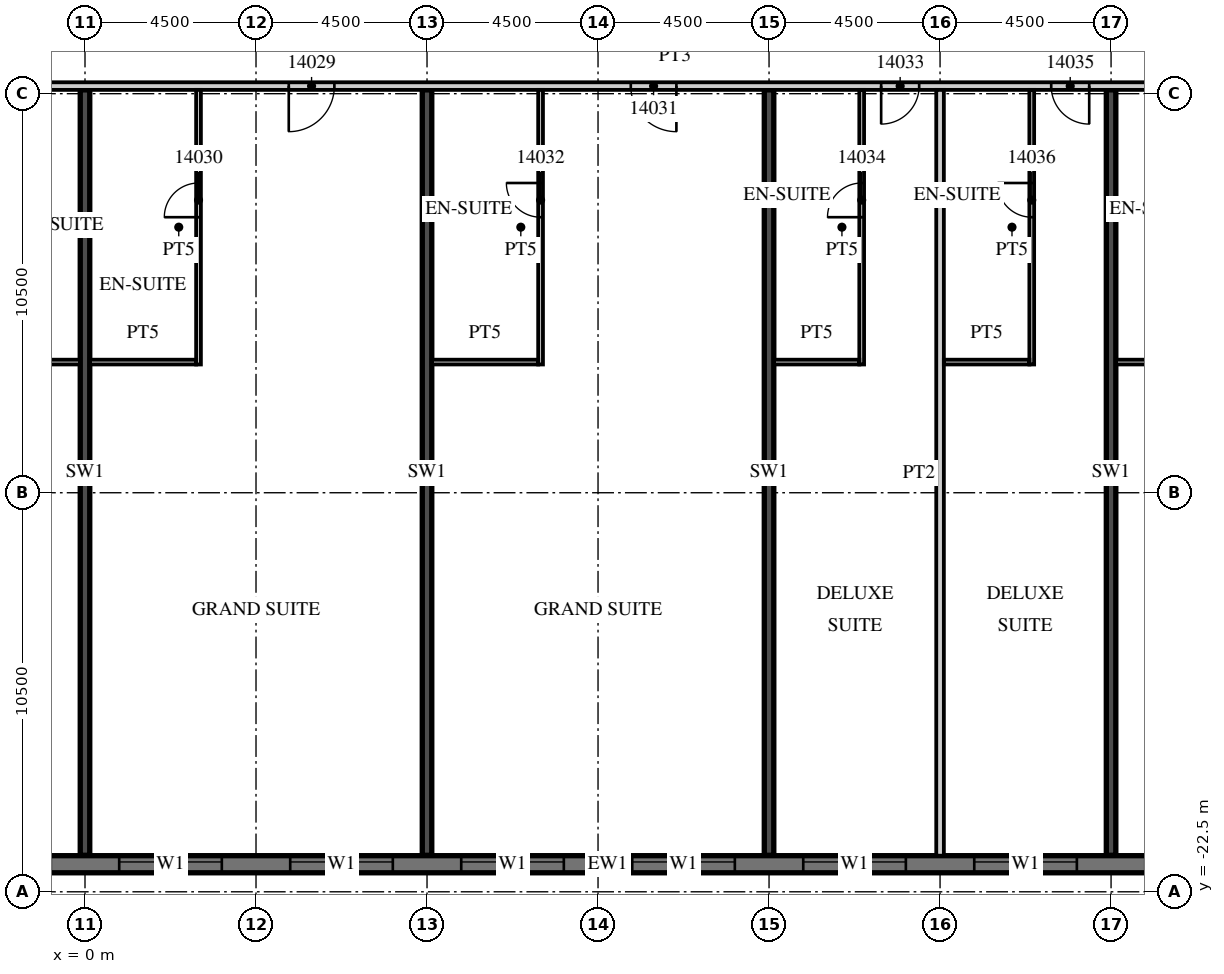
"""IFC4 building model, lengths in metres.
Left out: names, types, materials, properties, quantities, classifications, styles, units other than length and angle.
Written with IfcOpenShell. Run it as: python <this file> out.ifc"""

import sys

from ifc_helpers import new_model, si_unit, direction, frame, frame_2d, origin, place, context, subcontext, project, spatial, rectangle, extrude, element, fill, save


model = new_model("IFC4")
c1 = context("Model", 3, precision=1e-05, world=origin(), true_north=direction((0.0, 1.0)))
c2 = subcontext(c1, "Body", "Model", "MODEL_VIEW")
j1 = project(units=[si_unit("LENGTHUNIT", "METRE"), si_unit("PLANEANGLEUNIT", "RADIAN")], contexts=[c1])
p1 = place(None, origin())
s1 = spatial("IfcSite", under=j1, at=p1, CompositionType="ELEMENT")
p2 = place(p1, origin())
s2 = spatial("IfcBuilding", under=s1, at=p2, CompositionType="ELEMENT")
p3 = place(p2, frame((0.0, 0.0, 76.5)))
s3 = spatial("IfcBuildingStorey", under=s2, at=p3, CompositionType="ELEMENT", Elevation=76.5)
for number, where, z_axis, x_axis in (
    (1, (0.0, -21.54, 0.0), (0.0, 0.0, 1.0), (0.0, 1.0, 0.0)),
    (2, (9.0, -21.54, 0.0), (0.0, 0.0, 1.0), (0.0, 1.0, 0.0)),
    (3, (18.0, -21.54, 0.0), (0.0, 0.0, 1.0), (0.0, 1.0, 0.0)),
    (4, (27.0, -21.54, 0.0), (0.0, 0.0, 1.0), (0.0, 1.0, 0.0)),
):
    element("IfcWall", number, at=place(p3, frame(where, z_axis=z_axis, x_axis=x_axis)), inside=s3, PredefinedType="SHEAR", context=c2, shape_type="SweptSolid", body=[
        extrude(rectangle(XDim=20.14, YDim=0.25, at=frame_2d((10.07, 0.0))), origin(), (0.0, 0.0, 1.0), 3.3),
    ])
p4 = place(p3, frame((-13.5, -21.775, 0.0), z_axis=(0.0, 0.0, 1.0), x_axis=(1.0, 0.0, 0.0)))
e5 = element("IfcWall", 5, at=p4, inside=s3, PredefinedType="SOLIDWALL", context=c2, shape_type="SweptSolid", body=[
    extrude(rectangle(XDim=54.5, YDim=0.45, at=frame_2d((27.25, 0.0))), origin(), (0.0, 0.0, 1.0), 3.02),
])
p5 = place(p4, frame((0.9, 0.0, 0.45)))
e6 = element("IfcOpeningElement", 6, at=p5, cuts=e5, PredefinedType="OPENING", context=c2, shape_type="SweptSolid", body=[
    extrude(rectangle(XDim=2.7, YDim=2.25, at=frame_2d((1.35, 1.125))), frame((0.0, 0.235, 0.0), z_axis=(0.0, -1.0, 0.0), x_axis=(1.0, 0.0, 0.0)), (0.0, 0.0, 1.0), 0.47),
])
p6 = place(p4, frame((5.4, 0.0, 0.45)))
e7 = element("IfcOpeningElement", 7, at=p6, cuts=e5, PredefinedType="OPENING", context=c2, shape_type="SweptSolid", body=[
    extrude(rectangle(XDim=2.7, YDim=2.25, at=frame_2d((1.35, 1.125))), frame((0.0, 0.235, 0.0), z_axis=(0.0, -1.0, 0.0), x_axis=(1.0, 0.0, 0.0)), (0.0, 0.0, 1.0), 0.47),
])
p7 = place(p4, frame((9.9, 0.0, 0.45)))
e8 = element("IfcOpeningElement", 8, at=p7, cuts=e5, PredefinedType="OPENING", context=c2, shape_type="SweptSolid", body=[
    extrude(rectangle(XDim=2.7, YDim=2.25, at=frame_2d((1.35, 1.125))), frame((0.0, 0.235, 0.0), z_axis=(0.0, -1.0, 0.0), x_axis=(1.0, 0.0, 0.0)), (0.0, 0.0, 1.0), 0.47),
])
p8 = place(p4, frame((14.4, 0.0, 0.45)))
e9 = element("IfcOpeningElement", 9, at=p8, cuts=e5, PredefinedType="OPENING", context=c2, shape_type="SweptSolid", body=[
    extrude(rectangle(XDim=2.7, YDim=2.25, at=frame_2d((1.35, 1.125))), frame((0.0, 0.235, 0.0), z_axis=(0.0, -1.0, 0.0), x_axis=(1.0, 0.0, 0.0)), (0.0, 0.0, 1.0), 0.47),
])
p9 = place(p4, frame((18.9, 0.0, 0.45)))
e10 = element("IfcOpeningElement", 10, at=p9, cuts=e5, PredefinedType="OPENING", context=c2, shape_type="SweptSolid", body=[
    extrude(rectangle(XDim=2.7, YDim=2.25, at=frame_2d((1.35, 1.125))), frame((0.0, 0.235, 0.0), z_axis=(0.0, -1.0, 0.0), x_axis=(1.0, 0.0, 0.0)), (0.0, 0.0, 1.0), 0.47),
])
p10 = place(p4, frame((23.4, 0.0, 0.45)))
e11 = element("IfcOpeningElement", 11, at=p10, cuts=e5, PredefinedType="OPENING", context=c2, shape_type="SweptSolid", body=[
    extrude(rectangle(XDim=2.7, YDim=2.25, at=frame_2d((1.35, 1.125))), frame((0.0, 0.235, 0.0), z_axis=(0.0, -1.0, 0.0), x_axis=(1.0, 0.0, 0.0)), (0.0, 0.0, 1.0), 0.47),
])
p11 = place(p4, frame((27.9, 0.0, 0.45)))
e12 = element("IfcOpeningElement", 12, at=p11, cuts=e5, PredefinedType="OPENING", context=c2, shape_type="SweptSolid", body=[
    extrude(rectangle(XDim=2.7, YDim=2.25, at=frame_2d((1.35, 1.125))), frame((0.0, 0.235, 0.0), z_axis=(0.0, -1.0, 0.0), x_axis=(1.0, 0.0, 0.0)), (0.0, 0.0, 1.0), 0.47),
])
p12 = place(p4, frame((32.4, 0.0, 0.45)))
e13 = element("IfcOpeningElement", 13, at=p12, cuts=e5, PredefinedType="OPENING", context=c2, shape_type="SweptSolid", body=[
    extrude(rectangle(XDim=2.7, YDim=2.25, at=frame_2d((1.35, 1.125))), frame((0.0, 0.235, 0.0), z_axis=(0.0, -1.0, 0.0), x_axis=(1.0, 0.0, 0.0)), (0.0, 0.0, 1.0), 0.47),
])
p13 = place(p4, frame((36.9, 0.0, 0.45)))
e14 = element("IfcOpeningElement", 14, at=p13, cuts=e5, PredefinedType="OPENING", context=c2, shape_type="SweptSolid", body=[
    extrude(rectangle(XDim=2.7, YDim=2.25, at=frame_2d((1.35, 1.125))), frame((0.0, 0.235, 0.0), z_axis=(0.0, -1.0, 0.0), x_axis=(1.0, 0.0, 0.0)), (0.0, 0.0, 1.0), 0.47),
])
p14 = place(p4, frame((41.4, 0.0, 0.45)))
e15 = element("IfcOpeningElement", 15, at=p14, cuts=e5, PredefinedType="OPENING", context=c2, shape_type="SweptSolid", body=[
    extrude(rectangle(XDim=2.7, YDim=2.25, at=frame_2d((1.35, 1.125))), frame((0.0, 0.235, 0.0), z_axis=(0.0, -1.0, 0.0), x_axis=(1.0, 0.0, 0.0)), (0.0, 0.0, 1.0), 0.47),
])
p15 = place(p4, frame((45.9, 0.0, 0.45)))
e16 = element("IfcOpeningElement", 16, at=p15, cuts=e5, PredefinedType="OPENING", context=c2, shape_type="SweptSolid", body=[
    extrude(rectangle(XDim=2.7, YDim=2.25, at=frame_2d((1.35, 1.125))), frame((0.0, 0.235, 0.0), z_axis=(0.0, -1.0, 0.0), x_axis=(1.0, 0.0, 0.0)), (0.0, 0.0, 1.0), 0.47),
])
p16 = place(p4, frame((50.4, 0.0, 0.45)))
e17 = element("IfcOpeningElement", 17, at=p16, cuts=e5, PredefinedType="OPENING", context=c2, shape_type="SweptSolid", body=[
    extrude(rectangle(XDim=2.7, YDim=2.25, at=frame_2d((1.35, 1.125))), frame((0.0, 0.235, 0.0), z_axis=(0.0, -1.0, 0.0), x_axis=(1.0, 0.0, 0.0)), (0.0, 0.0, 1.0), 0.47),
])
p17 = place(p3, frame((-13.5, -1.3, 0.0), z_axis=(0.0, 0.0, 1.0), x_axis=(1.0, 0.0, 0.0)))
e18 = element("IfcWall", 18, at=p17, inside=s3, PredefinedType="PARTITIONING", context=c2, shape_type="SweptSolid", body=[
    extrude(rectangle(XDim=58.05, YDim=0.2, at=frame_2d((29.025, 0.0))), origin(), (0.0, 0.0, 1.0), 3.02),
])
p18 = place(p17, frame((2.925, 0.0, 0.0)))
e19 = element("IfcOpeningElement", 19, at=p18, cuts=e18, PredefinedType="OPENING", context=c2, shape_type="SweptSolid", body=[
    extrude(rectangle(XDim=1.0, YDim=2.1, at=frame_2d((0.5, 1.05))), frame((0.0, 0.11, 0.0), z_axis=(0.0, -1.0, 0.0), x_axis=(1.0, 0.0, 0.0)), (0.0, 0.0, 1.0), 0.22),
])
p19 = place(p17, frame((5.075, 0.0, 0.0)))
e20 = element("IfcOpeningElement", 20, at=p19, cuts=e18, PredefinedType="OPENING", context=c2, shape_type="SweptSolid", body=[
    extrude(rectangle(XDim=1.0, YDim=2.1, at=frame_2d((0.5, 1.05))), frame((0.0, 0.11, 0.0), z_axis=(0.0, -1.0, 0.0), x_axis=(1.0, 0.0, 0.0)), (0.0, 0.0, 1.0), 0.22),
])
p20 = place(p17, frame((9.55, 0.0, 0.0)))
e21 = element("IfcOpeningElement", 21, at=p20, cuts=e18, PredefinedType="OPENING", context=c2, shape_type="SweptSolid", body=[
    extrude(rectangle(XDim=1.0, YDim=2.1, at=frame_2d((0.5, 1.05))), frame((0.0, 0.11, 0.0), z_axis=(0.0, -1.0, 0.0), x_axis=(1.0, 0.0, 0.0)), (0.0, 0.0, 1.0), 0.22),
])
p21 = place(p17, frame((18.862, 0.0, 0.0)))
e22 = element("IfcOpeningElement", 22, at=p21, cuts=e18, PredefinedType="OPENING", context=c2, shape_type="SweptSolid", body=[
    extrude(rectangle(XDim=1.2, YDim=2.1, at=frame_2d((0.6, 1.05))), frame((0.0, 0.11, 0.0), z_axis=(0.0, -1.0, 0.0), x_axis=(1.0, 0.0, 0.0)), (0.0, 0.0, 1.0), 0.22),
])
p22 = place(p17, frame((27.862, 0.0, 0.0)))
e23 = element("IfcOpeningElement", 23, at=p22, cuts=e18, PredefinedType="OPENING", context=c2, shape_type="SweptSolid", body=[
    extrude(rectangle(XDim=1.2, YDim=2.1, at=frame_2d((0.6, 1.05))), frame((0.0, 0.11, 0.0), z_axis=(0.0, -1.0, 0.0), x_axis=(1.0, 0.0, 0.0)), (0.0, 0.0, 1.0), 0.22),
])
p23 = place(p17, frame((34.45, 0.0, 0.0)))
e24 = element("IfcOpeningElement", 24, at=p23, cuts=e18, PredefinedType="OPENING", context=c2, shape_type="SweptSolid", body=[
    extrude(rectangle(XDim=1.0, YDim=2.1, at=frame_2d((0.5, 1.05))), frame((0.0, 0.11, 0.0), z_axis=(0.0, -1.0, 0.0), x_axis=(1.0, 0.0, 0.0)), (0.0, 0.0, 1.0), 0.22),
])
p24 = place(p17, frame((38.925, 0.0, 0.0)))
e25 = element("IfcOpeningElement", 25, at=p24, cuts=e18, PredefinedType="OPENING", context=c2, shape_type="SweptSolid", body=[
    extrude(rectangle(XDim=1.0, YDim=2.1, at=frame_2d((0.5, 1.05))), frame((0.0, 0.11, 0.0), z_axis=(0.0, -1.0, 0.0), x_axis=(1.0, 0.0, 0.0)), (0.0, 0.0, 1.0), 0.22),
])
p25 = place(p17, frame((45.862, 0.0, 0.0)))
e26 = element("IfcOpeningElement", 26, at=p25, cuts=e18, PredefinedType="OPENING", context=c2, shape_type="SweptSolid", body=[
    extrude(rectangle(XDim=1.2, YDim=2.1, at=frame_2d((0.6, 1.05))), frame((0.0, 0.11, 0.0), z_axis=(0.0, -1.0, 0.0), x_axis=(1.0, 0.0, 0.0)), (0.0, 0.0, 1.0), 0.22),
])
p26 = place(p17, frame((50.075, 0.0, 0.0)))
e27 = element("IfcOpeningElement", 27, at=p26, cuts=e18, PredefinedType="OPENING", context=c2, shape_type="SweptSolid", body=[
    extrude(rectangle(XDim=1.0, YDim=2.1, at=frame_2d((0.5, 1.05))), frame((0.0, 0.11, 0.0), z_axis=(0.0, -1.0, 0.0), x_axis=(1.0, 0.0, 0.0)), (0.0, 0.0, 1.0), 0.22),
])
p27 = place(p17, frame((56.525, 0.0, 0.0)))
e28 = element("IfcOpeningElement", 28, at=p27, cuts=e18, PredefinedType="OPENING", context=c2, shape_type="SweptSolid", body=[
    extrude(rectangle(XDim=1.0, YDim=2.1, at=frame_2d((0.5, 1.05))), frame((0.0, 0.11, 0.0), z_axis=(0.0, -1.0, 0.0), x_axis=(1.0, 0.0, 0.0)), (0.0, 0.0, 1.0), 0.22),
])
p28 = place(p3, frame((-2.375, -8.562, 0.0), z_axis=(0.0, 0.0, 1.0), x_axis=(1.0, 0.0, 0.0)))
e29 = element("IfcWall", 29, at=p28, inside=s3, PredefinedType="PARTITIONING", context=c2, shape_type="SweptSolid", body=[
    extrude(rectangle(XDim=2.25, YDim=0.125, at=frame_2d((1.125, 0.0))), origin(), (0.0, 0.0, 1.0), 3.02),
])
p29 = place(p3, frame((2.987, -8.625, 0.0), z_axis=(0.0, 0.0, 1.0), x_axis=(0.0, 1.0, 0.0)))
e30 = element("IfcWall", 30, at=p29, inside=s3, PredefinedType="PARTITIONING", context=c2, shape_type="SweptSolid", body=[
    extrude(rectangle(XDim=7.225, YDim=0.125, at=frame_2d((3.613, 0.0))), origin(), (0.0, 0.0, 1.0), 3.02),
])
p30 = place(p29, frame((3.875, 0.0, 0.0)))
e31 = element("IfcOpeningElement", 31, at=p30, cuts=e30, PredefinedType="OPENING", context=c2, shape_type="SweptSolid", body=[
    extrude(rectangle(XDim=0.9, YDim=2.1, at=frame_2d((0.45, 1.05))), frame((0.0, 0.073, 0.0), z_axis=(0.0, -1.0, 0.0), x_axis=(1.0, 0.0, 0.0)), (0.0, 0.0, 1.0), 0.145),
])
p31 = place(p3, frame((0.125, -8.562, 0.0), z_axis=(0.0, 0.0, 1.0), x_axis=(1.0, 0.0, 0.0)))
e32 = element("IfcWall", 32, at=p31, inside=s3, PredefinedType="PARTITIONING", context=c2, shape_type="SweptSolid", body=[
    extrude(rectangle(XDim=2.8, YDim=0.125, at=frame_2d((1.4, 0.0))), origin(), (0.0, 0.0, 1.0), 3.02),
])
p32 = place(p3, frame((11.988, -8.625, 0.0), z_axis=(0.0, 0.0, 1.0), x_axis=(0.0, 1.0, 0.0)))
e33 = element("IfcWall", 33, at=p32, inside=s3, PredefinedType="PARTITIONING", context=c2, shape_type="SweptSolid", body=[
    extrude(rectangle(XDim=7.225, YDim=0.125, at=frame_2d((3.613, 0.0))), origin(), (0.0, 0.0, 1.0), 3.02),
])
p33 = place(p32, frame((3.875, 0.0, 0.0)))
e34 = element("IfcOpeningElement", 34, at=p33, cuts=e33, PredefinedType="OPENING", context=c2, shape_type="SweptSolid", body=[
    extrude(rectangle(XDim=0.9, YDim=2.1, at=frame_2d((0.45, 1.05))), frame((0.0, 0.073, 0.0), z_axis=(0.0, -1.0, 0.0), x_axis=(1.0, 0.0, 0.0)), (0.0, 0.0, 1.0), 0.145),
])
p34 = place(p3, frame((9.125, -8.562, 0.0), z_axis=(0.0, 0.0, 1.0), x_axis=(1.0, 0.0, 0.0)))
e35 = element("IfcWall", 35, at=p34, inside=s3, PredefinedType="PARTITIONING", context=c2, shape_type="SweptSolid", body=[
    extrude(rectangle(XDim=2.8, YDim=0.125, at=frame_2d((1.4, 0.0))), origin(), (0.0, 0.0, 1.0), 3.02),
])
p35 = place(p3, frame((22.5, -21.55, 0.0), z_axis=(0.0, 0.0, 1.0), x_axis=(0.0, 1.0, 0.0)))
e36 = element("IfcWall", 36, at=p35, inside=s3, PredefinedType="PARTITIONING", context=c2, shape_type="SweptSolid", body=[
    extrude(rectangle(XDim=20.15, YDim=0.2, at=frame_2d((10.075, 0.0))), origin(), (0.0, 0.0, 1.0), 3.02),
])
p36 = place(p3, frame((20.438, -8.625, 0.0), z_axis=(0.0, 0.0, 1.0), x_axis=(0.0, 1.0, 0.0)))
e37 = element("IfcWall", 37, at=p36, inside=s3, PredefinedType="PARTITIONING", context=c2, shape_type="SweptSolid", body=[
    extrude(rectangle(XDim=7.225, YDim=0.125, at=frame_2d((3.613, 0.0))), origin(), (0.0, 0.0, 1.0), 3.02),
])
p37 = place(p36, frame((3.875, 0.0, 0.0)))
e38 = element("IfcOpeningElement", 38, at=p37, cuts=e37, PredefinedType="OPENING", context=c2, shape_type="SweptSolid", body=[
    extrude(rectangle(XDim=0.9, YDim=2.1, at=frame_2d((0.45, 1.05))), frame((0.0, 0.073, 0.0), z_axis=(0.0, -1.0, 0.0), x_axis=(1.0, 0.0, 0.0)), (0.0, 0.0, 1.0), 0.145),
])
p38 = place(p3, frame((18.125, -8.562, 0.0), z_axis=(0.0, 0.0, 1.0), x_axis=(1.0, 0.0, 0.0)))
e39 = element("IfcWall", 39, at=p38, inside=s3, PredefinedType="PARTITIONING", context=c2, shape_type="SweptSolid", body=[
    extrude(rectangle(XDim=2.25, YDim=0.125, at=frame_2d((1.125, 0.0))), origin(), (0.0, 0.0, 1.0), 3.02),
])
p39 = place(p3, frame((24.913, -8.625, 0.0), z_axis=(0.0, 0.0, 1.0), x_axis=(0.0, 1.0, 0.0)))
e40 = element("IfcWall", 40, at=p39, inside=s3, PredefinedType="PARTITIONING", context=c2, shape_type="SweptSolid", body=[
    extrude(rectangle(XDim=7.225, YDim=0.125, at=frame_2d((3.613, 0.0))), origin(), (0.0, 0.0, 1.0), 3.02),
])
p40 = place(p39, frame((3.875, 0.0, 0.0)))
e41 = element("IfcOpeningElement", 41, at=p40, cuts=e40, PredefinedType="OPENING", context=c2, shape_type="SweptSolid", body=[
    extrude(rectangle(XDim=0.9, YDim=2.1, at=frame_2d((0.45, 1.05))), frame((0.0, 0.073, 0.0), z_axis=(0.0, -1.0, 0.0), x_axis=(1.0, 0.0, 0.0)), (0.0, 0.0, 1.0), 0.145),
])
p41 = place(p3, frame((22.6, -8.562, 0.0), z_axis=(0.0, 0.0, 1.0), x_axis=(1.0, 0.0, 0.0)))
e42 = element("IfcWall", 42, at=p41, inside=s3, PredefinedType="PARTITIONING", context=c2, shape_type="SweptSolid", body=[
    extrude(rectangle(XDim=2.25, YDim=0.125, at=frame_2d((1.125, 0.0))), origin(), (0.0, 0.0, 1.0), 3.02),
])
p42 = place(p3, frame((27.125, -8.562, 0.0), z_axis=(0.0, 0.0, 1.0), x_axis=(1.0, 0.0, 0.0)))
e43 = element("IfcWall", 43, at=p42, inside=s3, PredefinedType="PARTITIONING", context=c2, shape_type="SweptSolid", body=[
    extrude(rectangle(XDim=2.8, YDim=0.125, at=frame_2d((1.4, 0.0))), origin(), (0.0, 0.0, 1.0), 3.02),
])
p43 = place(p8, origin())
e44 = element("IfcWindow", 44, at=p43, inside=s3, PartitioningType="SINGLE_PANEL", PredefinedType="WINDOW", context=c2, shape_type="SweptSolid", body=[
    extrude(rectangle(XDim=2.7, YDim=2.25, at=frame_2d((1.35, 1.125))), frame((0.0, 0.09, 0.0), z_axis=(0.0, -1.0, 0.0), x_axis=(1.0, 0.0, 0.0)), (0.0, 0.0, 1.0), 0.06),
])
fill(e9, e44)
p44 = place(p9, origin())
e45 = element("IfcWindow", 45, at=p44, inside=s3, PartitioningType="SINGLE_PANEL", PredefinedType="WINDOW", context=c2, shape_type="SweptSolid", body=[
    extrude(rectangle(XDim=2.7, YDim=2.25, at=frame_2d((1.35, 1.125))), frame((0.0, 0.09, 0.0), z_axis=(0.0, -1.0, 0.0), x_axis=(1.0, 0.0, 0.0)), (0.0, 0.0, 1.0), 0.06),
])
fill(e10, e45)
p45 = place(p10, origin())
e46 = element("IfcWindow", 46, at=p45, inside=s3, PartitioningType="SINGLE_PANEL", PredefinedType="WINDOW", context=c2, shape_type="SweptSolid", body=[
    extrude(rectangle(XDim=2.7, YDim=2.25, at=frame_2d((1.35, 1.125))), frame((0.0, 0.09, 0.0), z_axis=(0.0, -1.0, 0.0), x_axis=(1.0, 0.0, 0.0)), (0.0, 0.0, 1.0), 0.06),
])
fill(e11, e46)
p46 = place(p11, origin())
e47 = element("IfcWindow", 47, at=p46, inside=s3, PartitioningType="SINGLE_PANEL", PredefinedType="WINDOW", context=c2, shape_type="SweptSolid", body=[
    extrude(rectangle(XDim=2.7, YDim=2.25, at=frame_2d((1.35, 1.125))), frame((0.0, 0.09, 0.0), z_axis=(0.0, -1.0, 0.0), x_axis=(1.0, 0.0, 0.0)), (0.0, 0.0, 1.0), 0.06),
])
fill(e12, e47)
p47 = place(p12, origin())
e48 = element("IfcWindow", 48, at=p47, inside=s3, PartitioningType="SINGLE_PANEL", PredefinedType="WINDOW", context=c2, shape_type="SweptSolid", body=[
    extrude(rectangle(XDim=2.7, YDim=2.25, at=frame_2d((1.35, 1.125))), frame((0.0, 0.09, 0.0), z_axis=(0.0, -1.0, 0.0), x_axis=(1.0, 0.0, 0.0)), (0.0, 0.0, 1.0), 0.06),
])
fill(e13, e48)
p48 = place(p13, origin())
e49 = element("IfcWindow", 49, at=p48, inside=s3, PartitioningType="SINGLE_PANEL", PredefinedType="WINDOW", context=c2, shape_type="SweptSolid", body=[
    extrude(rectangle(XDim=2.7, YDim=2.25, at=frame_2d((1.35, 1.125))), frame((0.0, 0.09, 0.0), z_axis=(0.0, -1.0, 0.0), x_axis=(1.0, 0.0, 0.0)), (0.0, 0.0, 1.0), 0.06),
])
fill(e14, e49)
p49 = place(p21, origin())
e50 = element("IfcDoor", 50, at=p49, inside=s3, OperationType="SINGLE_SWING_LEFT", PredefinedType="DOOR", context=c2, shape_type="SweptSolid", body=[
    extrude(rectangle(XDim=1.2, YDim=2.1, at=frame_2d((0.6, 1.05))), frame((0.0, 0.025, 0.0), z_axis=(0.0, -1.0, 0.0), x_axis=(1.0, 0.0, 0.0)), (0.0, 0.0, 1.0), 0.05),
])
fill(e22, e50)
p50 = place(p30, origin())
e51 = element("IfcDoor", 51, at=p50, inside=s3, OperationType="SINGLE_SWING_LEFT", PredefinedType="DOOR", context=c2, shape_type="SweptSolid", body=[
    extrude(rectangle(XDim=0.9, YDim=2.1, at=frame_2d((0.45, 1.05))), frame((0.0, 0.025, 0.0), z_axis=(0.0, -1.0, 0.0), x_axis=(1.0, 0.0, 0.0)), (0.0, 0.0, 1.0), 0.05),
])
fill(e31, e51)
p51 = place(p22, origin())
e52 = element("IfcDoor", 52, at=p51, inside=s3, OperationType="SINGLE_SWING_RIGHT", PredefinedType="DOOR", context=c2, shape_type="SweptSolid", body=[
    extrude(rectangle(XDim=1.2, YDim=2.1, at=frame_2d((0.6, 1.05))), frame((0.0, 0.025, 0.0), z_axis=(0.0, -1.0, 0.0), x_axis=(1.0, 0.0, 0.0)), (0.0, 0.0, 1.0), 0.05),
])
fill(e23, e52)
p52 = place(p33, origin())
e53 = element("IfcDoor", 53, at=p52, inside=s3, OperationType="SINGLE_SWING_RIGHT", PredefinedType="DOOR", context=c2, shape_type="SweptSolid", body=[
    extrude(rectangle(XDim=0.9, YDim=2.1, at=frame_2d((0.45, 1.05))), frame((0.0, 0.025, 0.0), z_axis=(0.0, -1.0, 0.0), x_axis=(1.0, 0.0, 0.0)), (0.0, 0.0, 1.0), 0.05),
])
fill(e34, e53)
p53 = place(p23, origin())
e54 = element("IfcDoor", 54, at=p53, inside=s3, OperationType="SINGLE_SWING_LEFT", PredefinedType="DOOR", context=c2, shape_type="SweptSolid", body=[
    extrude(rectangle(XDim=1.0, YDim=2.1, at=frame_2d((0.5, 1.05))), frame((0.0, 0.025, 0.0), z_axis=(0.0, -1.0, 0.0), x_axis=(1.0, 0.0, 0.0)), (0.0, 0.0, 1.0), 0.05),
])
fill(e24, e54)
p54 = place(p37, origin())
e55 = element("IfcDoor", 55, at=p54, inside=s3, OperationType="SINGLE_SWING_LEFT", PredefinedType="DOOR", context=c2, shape_type="SweptSolid", body=[
    extrude(rectangle(XDim=0.9, YDim=2.1, at=frame_2d((0.45, 1.05))), frame((0.0, 0.025, 0.0), z_axis=(0.0, -1.0, 0.0), x_axis=(1.0, 0.0, 0.0)), (0.0, 0.0, 1.0), 0.05),
])
fill(e38, e55)
p55 = place(p24, origin())
e56 = element("IfcDoor", 56, at=p55, inside=s3, OperationType="SINGLE_SWING_RIGHT", PredefinedType="DOOR", context=c2, shape_type="SweptSolid", body=[
    extrude(rectangle(XDim=1.0, YDim=2.1, at=frame_2d((0.5, 1.05))), frame((0.0, 0.025, 0.0), z_axis=(0.0, -1.0, 0.0), x_axis=(1.0, 0.0, 0.0)), (0.0, 0.0, 1.0), 0.05),
])
fill(e25, e56)
p56 = place(p40, origin())
e57 = element("IfcDoor", 57, at=p56, inside=s3, OperationType="SINGLE_SWING_RIGHT", PredefinedType="DOOR", context=c2, shape_type="SweptSolid", body=[
    extrude(rectangle(XDim=0.9, YDim=2.1, at=frame_2d((0.45, 1.05))), frame((0.0, 0.025, 0.0), z_axis=(0.0, -1.0, 0.0), x_axis=(1.0, 0.0, 0.0)), (0.0, 0.0, 1.0), 0.05),
])
fill(e41, e57)
save(model, sys.argv[1])
